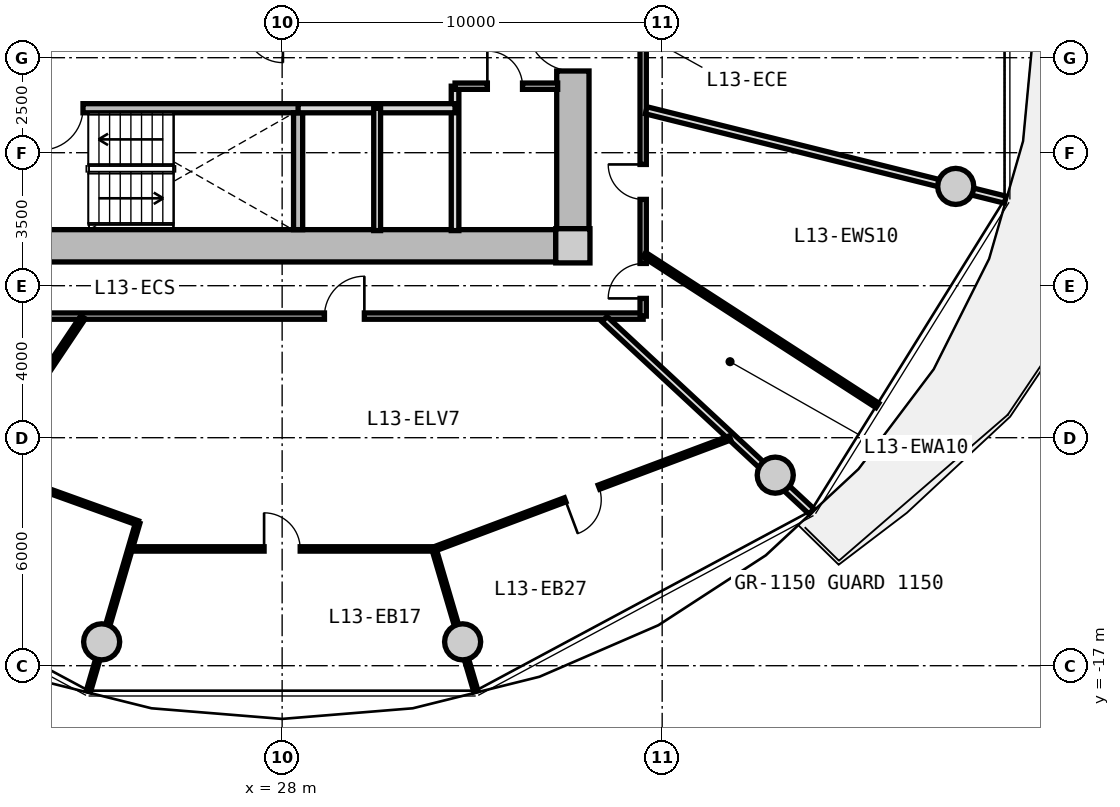
"""IFC4 building model, lengths in metres.
Left out: names, types, materials, properties, quantities, classifications, styles, units other than length and angle.
Written with IfcOpenShell. Run it as: python <this file> out.ifc"""

import sys

from ifc_helpers import new_model, si_unit, direction, frame, frame_2d, origin, origin_2d, place, context, subcontext, project, spatial, rectangle, circle, extrude, source, transform, mapped, element, fill, save


model = new_model("IFC4")
c1 = context("Model", 3, precision=1e-05, world=origin(), true_north=direction((0.0, 1.0)))
c2 = subcontext(c1, "Body", "Model", "MODEL_VIEW")
j1 = project(units=[si_unit("LENGTHUNIT", "METRE"), si_unit("PLANEANGLEUNIT", "RADIAN")], contexts=[c1])
p1 = place(None, origin())
s1 = spatial("IfcSite", under=j1, at=p1, CompositionType="ELEMENT")
p2 = place(p1, origin())
s2 = spatial("IfcBuilding", under=s1, at=p2, CompositionType="ELEMENT")
p3 = place(p2, frame((0.0, 0.0, 46.0)))
s3 = spatial("IfcBuildingStorey", under=s2, at=p3, CompositionType="ELEMENT", Elevation=46.0)
m1 = source(origin(), c2, "Body", "SweptSolid", [
    extrude(rectangle(XDim=0.9, YDim=0.9, at=origin_2d()), origin(), (0.0, 0.0, 1.0), 3.05),
])
p4 = place(p3, frame((35.65, -5.95, 0.0), z_axis=(0.0, 0.0, 1.0), x_axis=(1.0, 0.0, 0.0)))
e1 = element("IfcColumn", 1, at=p4, inside=s3, PredefinedType="COLUMN", context=c2, shape_type="MappedRepresentation", body=[
    mapped(m1, transform((0.0, 0.0, 0.0), x_axis=(1.0, 0.0, 0.0), y_axis=(0.0, 1.0, 0.0), z_axis=(0.0, 0.0, 1.0), scale=1.0)),
])
m2 = source(origin(), c2, "Body", "SweptSolid", [
    extrude(rectangle(XDim=14.4, YDim=0.85, at=frame_2d((7.2, 0.0))), origin(), (0.0, 0.0, 1.0), 2.79),
])
p5 = place(p3, frame((35.2, -5.95, 0.0), z_axis=(0.0, 0.0, 1.0), x_axis=(-1.0, 0.0, 0.0)))
e2 = element("IfcWall", 2, at=p5, inside=s3, PredefinedType="SHEAR", context=c2, shape_type="MappedRepresentation", body=[
    mapped(m2, transform((0.0, 0.0, 0.0), x_axis=(1.0, 0.0, 0.0), y_axis=(0.0, 1.0, 0.0), z_axis=(0.0, 0.0, 1.0), scale=1.0)),
])
m3 = source(origin(), c2, "Body", "SweptSolid", [
    extrude(rectangle(XDim=11.0, YDim=0.85, at=frame_2d((5.5, 0.0))), origin(), (0.0, 0.0, 1.0), 2.79),
])
p6 = place(p3, frame((35.65, 5.5, 0.0), z_axis=(0.0, 0.0, 1.0), x_axis=(0.0, -1.0, 0.0)))
e3 = element("IfcWall", 3, at=p6, inside=s3, PredefinedType="SHEAR", context=c2, shape_type="MappedRepresentation", body=[
    mapped(m3, transform((0.0, 0.0, 0.0), x_axis=(1.0, 0.0, 0.0), y_axis=(0.0, 1.0, 0.0), z_axis=(0.0, 0.0, 1.0), scale=1.0)),
])
p7 = place(p6, frame((5.65, 0.0, 0.0)))
e4 = element("IfcOpeningElement", 4, at=p7, cuts=e3, PredefinedType="OPENING", context=c2, shape_type="SweptSolid", body=[
    extrude(rectangle(XDim=1.2, YDim=2.15, at=frame_2d((0.6, 1.075))), frame((0.0, 0.435, 0.0), z_axis=(0.0, -1.0, 0.0), x_axis=(1.0, 0.0, 0.0)), (0.0, 0.0, 1.0), 0.87),
])
m4 = source(origin(), c2, "Body", "SweptSolid", [
    extrude(circle(Radius=0.475, at=origin_2d()), origin(), (0.0, 0.0, 1.0), 3.05),
])
for number, where, z_axis, x_axis in (
    (5, (23.251, -16.373, 0.0), (0.0, 0.0, 1.0), (1.0, 0.0, 0.0)),
    (6, (32.749, -16.373, 0.0), (0.0, 0.0, 1.0), (1.0, 0.0, 0.0)),
    (7, (40.975, -11.985, 0.0), (0.0, 0.0, 1.0), (1.0, 0.0, 0.0)),
    (8, (45.725, -4.387, 0.0), (0.0, 0.0, 1.0), (1.0, 0.0, 0.0)),
):
    element("IfcColumn", number, at=place(p3, frame(where, z_axis=z_axis, x_axis=x_axis)), inside=s3, PredefinedType="COLUMN", context=c2, shape_type="MappedRepresentation", body=[
        mapped(m4, transform((0.0, 0.0, 0.0), x_axis=(1.0, 0.0, 0.0), y_axis=(0.0, 1.0, 0.0), z_axis=(0.0, 0.0, 1.0), scale=1.0)),
    ])
m5 = source(origin(), c2, "Body", "SweptSolid", [
    extrude(rectangle(XDim=7.765, YDim=0.24, at=frame_2d((3.883, 0.0))), origin(), (0.0, 0.0, 1.0), 2.79),
])
p8 = place(p3, frame((20.775, -2.33, 0.0), z_axis=(0.0, 0.0, 1.0), x_axis=(1.0, 0.0, 0.0)))
e9 = element("IfcWall", 9, at=p8, inside=s3, PredefinedType="PARTITIONING", context=c2, shape_type="MappedRepresentation", body=[
    mapped(m5, transform((0.0, 0.0, 0.0), x_axis=(1.0, 0.0, 0.0), y_axis=(0.0, 1.0, 0.0), z_axis=(0.0, 0.0, 1.0), scale=1.0)),
])
p9 = place(p8, frame((0.885, 0.0, 0.0)))
e10 = element("IfcOpeningElement", 10, at=p9, cuts=e9, PredefinedType="OPENING", context=c2, shape_type="SweptSolid", body=[
    extrude(rectangle(XDim=1.1, YDim=2.15, at=frame_2d((0.55, 1.075))), frame((0.0, 0.13, 0.0), z_axis=(0.0, -1.0, 0.0), x_axis=(1.0, 0.0, 0.0)), (0.0, 0.0, 1.0), 0.26),
])
m6 = source(origin(), c2, "Body", "SweptSolid", [
    extrude(rectangle(XDim=3.075, YDim=0.24, at=frame_2d((1.538, 0.0))), origin(), (0.0, 0.0, 1.0), 2.79),
])
p10 = place(p3, frame((28.42, -5.525, 0.0), z_axis=(0.0, 0.0, 1.0), x_axis=(0.0, 1.0, 0.0)))
e11 = element("IfcWall", 11, at=p10, inside=s3, PredefinedType="PARTITIONING", context=c2, shape_type="MappedRepresentation", body=[
    mapped(m6, transform((0.0, 0.0, 0.0), x_axis=(1.0, 0.0, 0.0), y_axis=(0.0, 1.0, 0.0), z_axis=(0.0, 0.0, 1.0), scale=1.0)),
])
m7 = source(origin(), c2, "Body", "SweptSolid", [
    extrude(rectangle(XDim=3.8, YDim=0.2, at=frame_2d((1.9, 0.0))), origin(), (0.0, 0.0, 1.0), 2.775),
])
p11 = place(p3, frame((32.55, -5.55, 0.0), z_axis=(0.0, 0.0, 1.0), x_axis=(0.0, 1.0, 0.0)))
e12 = element("IfcWall", 12, at=p11, inside=s3, PredefinedType="PARTITIONING", context=c2, shape_type="MappedRepresentation", body=[
    mapped(m7, transform((0.0, 0.0, 0.0), x_axis=(1.0, 0.0, 0.0), y_axis=(0.0, 1.0, 0.0), z_axis=(0.0, 0.0, 1.0), scale=1.0)),
])
m8 = source(origin(), c2, "Body", "SweptSolid", [
    extrude(rectangle(XDim=4.13, YDim=0.24, at=frame_2d((2.065, 0.0))), origin(), (0.0, 0.0, 1.0), 2.775),
])
p12 = place(p3, frame((28.42, -2.33, 0.0), z_axis=(0.0, 0.0, 1.0), x_axis=(1.0, 0.0, 0.0)))
e13 = element("IfcWall", 13, at=p12, inside=s3, PredefinedType="PARTITIONING", context=c2, shape_type="MappedRepresentation", body=[
    mapped(m8, transform((0.0, 0.0, 0.0), x_axis=(1.0, 0.0, 0.0), y_axis=(0.0, 1.0, 0.0), z_axis=(0.0, 0.0, 1.0), scale=1.0)),
])
m9 = source(origin(), c2, "Body", "SweptSolid", [
    extrude(rectangle(XDim=3.22, YDim=0.18, at=frame_2d((1.61, 0.0))), origin(), (0.0, 0.0, 1.0), 2.775),
])
p13 = place(p3, frame((30.5, -5.55, 0.0), z_axis=(0.0, 0.0, 1.0), x_axis=(0.0, 1.0, 0.0)))
e14 = element("IfcWall", 14, at=p13, inside=s3, PredefinedType="PARTITIONING", context=c2, shape_type="MappedRepresentation", body=[
    mapped(m9, transform((0.0, 0.0, 0.0), x_axis=(1.0, 0.0, 0.0), y_axis=(0.0, 1.0, 0.0), z_axis=(0.0, 0.0, 1.0), scale=1.0)),
])
m10 = source(origin(), c2, "Body", "SweptSolid", [
    extrude(rectangle(XDim=2.7, YDim=0.165, at=frame_2d((1.35, 0.0))), origin(), (0.0, 0.0, 1.0), 2.775),
])
p14 = place(p3, frame((32.55, -1.75, 0.0), z_axis=(0.0, 0.0, 1.0), x_axis=(1.0, 0.0, 0.0)))
e15 = element("IfcWall", 15, at=p14, inside=s3, PredefinedType="PARTITIONING", context=c2, shape_type="MappedRepresentation", body=[
    mapped(m10, transform((0.0, 0.0, 0.0), x_axis=(1.0, 0.0, 0.0), y_axis=(0.0, 1.0, 0.0), z_axis=(0.0, 0.0, 1.0), scale=1.0)),
])
p15 = place(p14, frame((0.85, 0.0, 0.0)))
e16 = element("IfcOpeningElement", 16, at=p15, cuts=e15, PredefinedType="OPENING", context=c2, shape_type="SweptSolid", body=[
    extrude(rectangle(XDim=0.925, YDim=2.1, at=frame_2d((0.462, 1.05))), frame((0.0, 0.093, 0.0), z_axis=(0.0, -1.0, 0.0), x_axis=(1.0, 0.0, 0.0)), (0.0, 0.0, 1.0), 0.185),
])
m11 = source(origin(), c2, "Body", "SweptSolid", [
    extrude(rectangle(XDim=19.0, YDim=0.165, at=frame_2d((9.5, 0.0))), origin(), (0.0, 0.0, 1.0), 2.775),
])
p16 = place(p3, frame((37.5, -7.8, 0.0), z_axis=(0.0, 0.0, 1.0), x_axis=(-1.0, 0.0, 0.0)))
e17 = element("IfcWall", 17, at=p16, inside=s3, PredefinedType="PARTITIONING", context=c2, shape_type="MappedRepresentation", body=[
    mapped(m11, transform((0.0, 0.0, 0.0), x_axis=(1.0, 0.0, 0.0), y_axis=(0.0, 1.0, 0.0), z_axis=(0.0, 0.0, 1.0), scale=1.0)),
])
p17 = place(p16, frame((7.336, 0.0, 0.0)))
e18 = element("IfcOpeningElement", 18, at=p17, cuts=e17, PredefinedType="OPENING", context=c2, shape_type="SweptSolid", body=[
    extrude(rectangle(XDim=1.05, YDim=2.15, at=frame_2d((0.525, 1.075))), frame((0.0, 0.093, 0.0), z_axis=(0.0, -1.0, 0.0), x_axis=(1.0, 0.0, 0.0)), (0.0, 0.0, 1.0), 0.185),
])
m12 = source(origin(), c2, "Body", "SweptSolid", [
    extrude(rectangle(XDim=15.6, YDim=0.165, at=frame_2d((7.8, 0.0))), origin(), (0.0, 0.0, 1.0), 2.775),
])
p18 = place(p3, frame((37.5, 7.8, 0.0), z_axis=(0.0, 0.0, 1.0), x_axis=(0.0, -1.0, 0.0)))
e19 = element("IfcWall", 19, at=p18, inside=s3, PredefinedType="PARTITIONING", context=c2, shape_type="MappedRepresentation", body=[
    mapped(m12, transform((0.0, 0.0, 0.0), x_axis=(1.0, 0.0, 0.0), y_axis=(0.0, 1.0, 0.0), z_axis=(0.0, 0.0, 1.0), scale=1.0)),
])
p19 = place(p18, frame((14.215, 0.0, 0.0)))
e20 = element("IfcOpeningElement", 20, at=p19, cuts=e19, PredefinedType="OPENING", context=c2, shape_type="SweptSolid", body=[
    extrude(rectangle(XDim=0.92, YDim=2.1, at=frame_2d((0.46, 1.05))), frame((0.0, 0.093, 0.0), z_axis=(0.0, -1.0, 0.0), x_axis=(1.0, 0.0, 0.0)), (0.0, 0.0, 1.0), 0.185),
])
p20 = place(p18, frame((11.609, 0.0, 0.0)))
e21 = element("IfcOpeningElement", 21, at=p20, cuts=e19, PredefinedType="OPENING", context=c2, shape_type="SweptSolid", body=[
    extrude(rectangle(XDim=0.92, YDim=2.1, at=frame_2d((0.46, 1.05))), frame((0.0, 0.093, 0.0), z_axis=(0.0, -1.0, 0.0), x_axis=(1.0, 0.0, 0.0)), (0.0, 0.0, 1.0), 0.185),
])
p21 = place(p18, frame((7.175, 0.0, 0.0)))
e22 = element("IfcOpeningElement", 22, at=p21, cuts=e19, PredefinedType="OPENING", context=c2, shape_type="SweptSolid", body=[
    extrude(rectangle(XDim=1.25, YDim=2.2, at=frame_2d((0.625, 1.1))), frame((0.0, 0.093, 0.0), z_axis=(0.0, -1.0, 0.0), x_axis=(1.0, 0.0, 0.0)), (0.0, 0.0, 1.0), 0.185),
])
m13 = source(origin(), c2, "Body", "SweptSolid", [
    extrude(rectangle(XDim=7.435, YDim=0.19, at=frame_2d((3.717, 0.0))), origin(), (0.0, 0.0, 1.0), 2.225),
])
p22 = place(p3, frame((36.483, -7.88, 0.0), z_axis=(0.0, 0.0, 1.0), x_axis=(0.732651956848, -0.680603489652, 0.0)))
e23 = element("IfcWall", 23, at=p22, inside=s3, PredefinedType="PARTITIONING", context=c2, shape_type="MappedRepresentation", body=[
    mapped(m13, transform((0.0, 0.0, 0.0), x_axis=(1.0, 0.0, 0.0), y_axis=(0.0, 1.0, 0.0), z_axis=(0.0, 0.0, 1.0), scale=1.0)),
])
m14 = source(origin(), c2, "Body", "SweptSolid", [
    extrude(rectangle(XDim=7.993, YDim=0.115, at=frame_2d((3.996, 0.0))), origin(), (0.0, 0.0, 1.0), 2.775),
])
p23 = place(p3, frame((24.004, -13.927, 0.0), z_axis=(0.0, 0.0, 1.0), x_axis=(1.0, 0.0, 0.0)))
e24 = element("IfcWall", 24, at=p23, inside=s3, PredefinedType="PARTITIONING", context=c2, shape_type="MappedRepresentation", body=[
    mapped(m14, transform((0.0, 0.0, 0.0), x_axis=(1.0, 0.0, 0.0), y_axis=(0.0, 1.0, 0.0), z_axis=(0.0, 0.0, 1.0), scale=1.0)),
])
p24 = place(p23, frame((3.521, 0.0, 0.0)))
e25 = element("IfcOpeningElement", 25, at=p24, cuts=e24, PredefinedType="OPENING", context=c2, shape_type="SweptSolid", body=[
    extrude(rectangle(XDim=0.95, YDim=2.1, at=frame_2d((0.475, 1.05))), frame((0.0, 0.067, 0.0), z_axis=(0.0, -1.0, 0.0), x_axis=(1.0, 0.0, 0.0)), (0.0, 0.0, 1.0), 0.135),
])
m15 = source(origin(), c2, "Body", "SweptSolid", [
    extrude(rectangle(XDim=4.625, YDim=0.115, at=frame_2d((2.312, 0.0))), origin(), (0.0, 0.0, 1.0), 2.225),
])
p25 = place(p3, frame((24.201, -13.239, 0.0), z_axis=(0.0, 0.0, 1.0), x_axis=(-0.2810742844, -0.959686014616, 0.0)))
e26 = element("IfcWall", 26, at=p25, inside=s3, PredefinedType="PARTITIONING", context=c2, shape_type="MappedRepresentation", body=[
    mapped(m15, transform((0.0, 0.0, 0.0), x_axis=(1.0, 0.0, 0.0), y_axis=(0.0, 1.0, 0.0), z_axis=(0.0, 0.0, 1.0), scale=1.0)),
])
m16 = source(origin(), c2, "Body", "SweptSolid", [
    extrude(rectangle(XDim=8.32, YDim=0.115, at=frame_2d((4.16, 0.0))), origin(), (0.0, 0.0, 1.0), 2.775),
])
p26 = place(p3, frame((31.997, -13.93, 0.0), z_axis=(0.0, 0.0, 1.0), x_axis=(0.936180763098, 0.351518959382, 0.0)))
e27 = element("IfcWall", 27, at=p26, inside=s3, PredefinedType="PARTITIONING", context=c2, shape_type="MappedRepresentation", body=[
    mapped(m16, transform((0.0, 0.0, 0.0), x_axis=(1.0, 0.0, 0.0), y_axis=(0.0, 1.0, 0.0), z_axis=(0.0, 0.0, 1.0), scale=1.0)),
])
p27 = place(p26, frame((3.685, 0.0, 0.0)))
e28 = element("IfcOpeningElement", 28, at=p27, cuts=e27, PredefinedType="OPENING", context=c2, shape_type="SweptSolid", body=[
    extrude(rectangle(XDim=0.95, YDim=2.1, at=frame_2d((0.475, 1.05))), frame((0.0, 0.067, 0.0), z_axis=(0.0, -1.0, 0.0), x_axis=(1.0, 0.0, 0.0)), (0.0, 0.0, 1.0), 0.135),
])
m17 = source(origin(), c2, "Body", "SweptSolid", [
    extrude(rectangle(XDim=3.905, YDim=0.115, at=frame_2d((1.952, 0.0))), origin(), (0.0, 0.0, 1.0), 2.225),
])
p28 = place(p3, frame((31.997, -13.93, 0.0), z_axis=(0.0, 0.0, 1.0), x_axis=(0.282037692958, -0.959403324859, 0.0)))
e29 = element("IfcWall", 29, at=p28, inside=s3, PredefinedType="PARTITIONING", context=c2, shape_type="MappedRepresentation", body=[
    mapped(m17, transform((0.0, 0.0, 0.0), x_axis=(1.0, 0.0, 0.0), y_axis=(0.0, 1.0, 0.0), z_axis=(0.0, 0.0, 1.0), scale=1.0)),
])
m18 = source(origin(), c2, "Body", "SweptSolid", [
    extrude(rectangle(XDim=3.025, YDim=0.14, at=frame_2d((1.513, 0.0))), origin(), (0.0, 0.0, 1.0), 2.775),
])
p29 = place(p3, frame((22.76, -7.83, 0.0), z_axis=(0.0, 0.0, 1.0), x_axis=(-0.556189165904, -0.831055721195, 0.0)))
e30 = element("IfcWall", 30, at=p29, inside=s3, PredefinedType="PARTITIONING", context=c2, shape_type="MappedRepresentation", body=[
    mapped(m18, transform((0.0, 0.0, 0.0), x_axis=(1.0, 0.0, 0.0), y_axis=(0.0, 1.0, 0.0), z_axis=(0.0, 0.0, 1.0), scale=1.0)),
])
m19 = source(origin(), c2, "Body", "SweptSolid", [
    extrude(rectangle(XDim=3.814, YDim=0.115, at=frame_2d((1.907, 0.0))), origin(), (0.0, 0.0, 1.0), 2.775),
])
p30 = place(p3, frame((20.611, -11.95, 0.0), z_axis=(0.0, 0.0, 1.0), x_axis=(0.940935542004, -0.338585743637, 0.0)))
e31 = element("IfcWall", 31, at=p30, inside=s3, PredefinedType="PARTITIONING", context=c2, shape_type="MappedRepresentation", body=[
    mapped(m19, transform((0.0, 0.0, 0.0), x_axis=(1.0, 0.0, 0.0), y_axis=(0.0, 1.0, 0.0), z_axis=(0.0, 0.0, 1.0), scale=1.0)),
])
m20 = source(origin(), c2, "Body", "SweptSolid", [
    extrude(rectangle(XDim=9.737, YDim=0.19, at=frame_2d((4.869, 0.0))), origin(), (0.0, 0.0, 1.0), 2.225),
])
p31 = place(p3, frame((37.58, -2.385, 0.0), z_axis=(0.0, 0.0, 1.0), x_axis=(0.970392716238, -0.241532557375, 0.0)))
e32 = element("IfcWall", 32, at=p31, inside=s3, PredefinedType="PARTITIONING", context=c2, shape_type="MappedRepresentation", body=[
    mapped(m20, transform((0.0, 0.0, 0.0), x_axis=(1.0, 0.0, 0.0), y_axis=(0.0, 1.0, 0.0), z_axis=(0.0, 0.0, 1.0), scale=1.0)),
])
m21 = source(origin(), c2, "Body", "SweptSolid", [
    extrude(rectangle(XDim=7.304, YDim=0.14, at=frame_2d((3.652, 0.0))), origin(), (0.0, 0.0, 1.0), 2.775),
])
p32 = place(p3, frame((37.53, -6.185, 0.0), z_axis=(0.0, 0.0, 1.0), x_axis=(0.83973870965, -0.54299069929, 0.0)))
e33 = element("IfcWall", 33, at=p32, inside=s3, PredefinedType="PARTITIONING", context=c2, shape_type="MappedRepresentation", body=[
    mapped(m21, transform((0.0, 0.0, 0.0), x_axis=(1.0, 0.0, 0.0), y_axis=(0.0, 1.0, 0.0), z_axis=(0.0, 0.0, 1.0), scale=1.0)),
])
m22 = source(origin(), c2, "Body", "SweptSolid", [
    extrude(rectangle(XDim=1.1, YDim=2.15, at=frame_2d((0.55, 1.075))), frame((0.0, 0.025, 0.0), z_axis=(0.0, -1.0, 0.0), x_axis=(1.0, 0.0, 0.0)), (0.0, 0.0, 1.0), 0.05),
])
p33 = place(p9, frame((1.1, 0.0, 0.0), z_axis=(0.0, 0.0, 1.0), x_axis=(-1.0, 0.0, 0.0)))
e34 = element("IfcDoor", 34, at=p33, inside=s3, OperationType="SINGLE_SWING_RIGHT", PredefinedType="DOOR", context=c2, shape_type="MappedRepresentation", body=[
    mapped(m22, transform((0.0, 0.0, 0.0), x_axis=(1.0, 0.0, 0.0), y_axis=(0.0, 1.0, 0.0), z_axis=(0.0, 0.0, 1.0), scale=1.0)),
])
fill(e10, e34)
m23 = source(origin(), c2, "Body", "SweptSolid", [
    extrude(rectangle(XDim=1.2, YDim=2.15, at=frame_2d((0.6, 1.075))), frame((0.0, 0.025, 0.0), z_axis=(0.0, -1.0, 0.0), x_axis=(1.0, 0.0, 0.0)), (0.0, 0.0, 1.0), 0.05),
])
p34 = place(p7, frame((1.2, 0.0, 0.0), z_axis=(0.0, 0.0, 1.0), x_axis=(-1.0, 0.0, 0.0)))
e35 = element("IfcDoor", 35, at=p34, inside=s3, OperationType="SINGLE_SWING_RIGHT", PredefinedType="DOOR", context=c2, shape_type="MappedRepresentation", body=[
    mapped(m23, transform((0.0, 0.0, 0.0), x_axis=(1.0, 0.0, 0.0), y_axis=(0.0, 1.0, 0.0), z_axis=(0.0, 0.0, 1.0), scale=1.0)),
])
fill(e4, e35)
m24 = source(origin(), c2, "Body", "SweptSolid", [
    extrude(rectangle(XDim=0.925, YDim=2.1, at=frame_2d((0.462, 1.05))), frame((0.0, 0.025, 0.0), z_axis=(0.0, -1.0, 0.0), x_axis=(1.0, 0.0, 0.0)), (0.0, 0.0, 1.0), 0.05),
])
p35 = place(p15, origin())
e36 = element("IfcDoor", 36, at=p35, inside=s3, OperationType="SINGLE_SWING_LEFT", PredefinedType="DOOR", context=c2, shape_type="MappedRepresentation", body=[
    mapped(m24, transform((0.0, 0.0, 0.0), x_axis=(1.0, 0.0, 0.0), y_axis=(0.0, 1.0, 0.0), z_axis=(0.0, 0.0, 1.0), scale=1.0)),
])
fill(e16, e36)
m25 = source(origin(), c2, "Body", "SweptSolid", [
    extrude(rectangle(XDim=1.05, YDim=2.15, at=frame_2d((0.525, 1.075))), frame((0.0, 0.025, 0.0), z_axis=(0.0, -1.0, 0.0), x_axis=(1.0, 0.0, 0.0)), (0.0, 0.0, 1.0), 0.05),
])
p36 = place(p17, frame((1.05, 0.0, 0.0), z_axis=(0.0, 0.0, 1.0), x_axis=(-1.0, 0.0, 0.0)))
e37 = element("IfcDoor", 37, at=p36, inside=s3, OperationType="SINGLE_SWING_RIGHT", PredefinedType="DOOR", context=c2, shape_type="MappedRepresentation", body=[
    mapped(m25, transform((0.0, 0.0, 0.0), x_axis=(1.0, 0.0, 0.0), y_axis=(0.0, 1.0, 0.0), z_axis=(0.0, 0.0, 1.0), scale=1.0)),
])
fill(e18, e37)
m26 = source(origin(), c2, "Body", "SweptSolid", [
    extrude(rectangle(XDim=0.95, YDim=2.1, at=frame_2d((0.475, 1.05))), frame((0.0, 0.025, 0.0), z_axis=(0.0, -1.0, 0.0), x_axis=(1.0, 0.0, 0.0)), (0.0, 0.0, 1.0), 0.05),
])
p37 = place(p24, origin())
e38 = element("IfcDoor", 38, at=p37, inside=s3, OperationType="SINGLE_SWING_LEFT", PredefinedType="DOOR", context=c2, shape_type="MappedRepresentation", body=[
    mapped(m26, transform((0.0, 0.0, 0.0), x_axis=(1.0, 0.0, 0.0), y_axis=(0.0, 1.0, 0.0), z_axis=(0.0, 0.0, 1.0), scale=1.0)),
])
fill(e25, e38)
p38 = place(p27, frame((0.95, 0.0, 0.0), z_axis=(0.0, 0.0, 1.0), x_axis=(-1.0, 0.0, 0.0)))
e39 = element("IfcDoor", 39, at=p38, inside=s3, OperationType="SINGLE_SWING_RIGHT", PredefinedType="DOOR", context=c2, shape_type="MappedRepresentation", body=[
    mapped(m26, transform((0.0, 0.0, 0.0), x_axis=(1.0, 0.0, 0.0), y_axis=(0.0, 1.0, 0.0), z_axis=(0.0, 0.0, 1.0), scale=1.0)),
])
fill(e28, e39)
m27 = source(origin(), c2, "Body", "SweptSolid", [
    extrude(rectangle(XDim=0.92, YDim=2.1, at=frame_2d((0.46, 1.05))), frame((0.0, 0.025, 0.0), z_axis=(0.0, -1.0, 0.0), x_axis=(1.0, 0.0, 0.0)), (0.0, 0.0, 1.0), 0.05),
])
p39 = place(p19, frame((0.92, 0.0, 0.0), z_axis=(0.0, 0.0, 1.0), x_axis=(-1.0, 0.0, 0.0)))
e40 = element("IfcDoor", 40, at=p39, inside=s3, OperationType="SINGLE_SWING_LEFT", PredefinedType="DOOR", context=c2, shape_type="MappedRepresentation", body=[
    mapped(m27, transform((0.0, 0.0, 0.0), x_axis=(1.0, 0.0, 0.0), y_axis=(0.0, 1.0, 0.0), z_axis=(0.0, 0.0, 1.0), scale=1.0)),
])
fill(e20, e40)
p40 = place(p20, frame((0.92, 0.0, 0.0), z_axis=(0.0, 0.0, 1.0), x_axis=(-1.0, 0.0, 0.0)))
e41 = element("IfcDoor", 41, at=p40, inside=s3, OperationType="SINGLE_SWING_RIGHT", PredefinedType="DOOR", context=c2, shape_type="MappedRepresentation", body=[
    mapped(m27, transform((0.0, 0.0, 0.0), x_axis=(1.0, 0.0, 0.0), y_axis=(0.0, 1.0, 0.0), z_axis=(0.0, 0.0, 1.0), scale=1.0)),
])
fill(e21, e41)
save(model, sys.argv[1])
